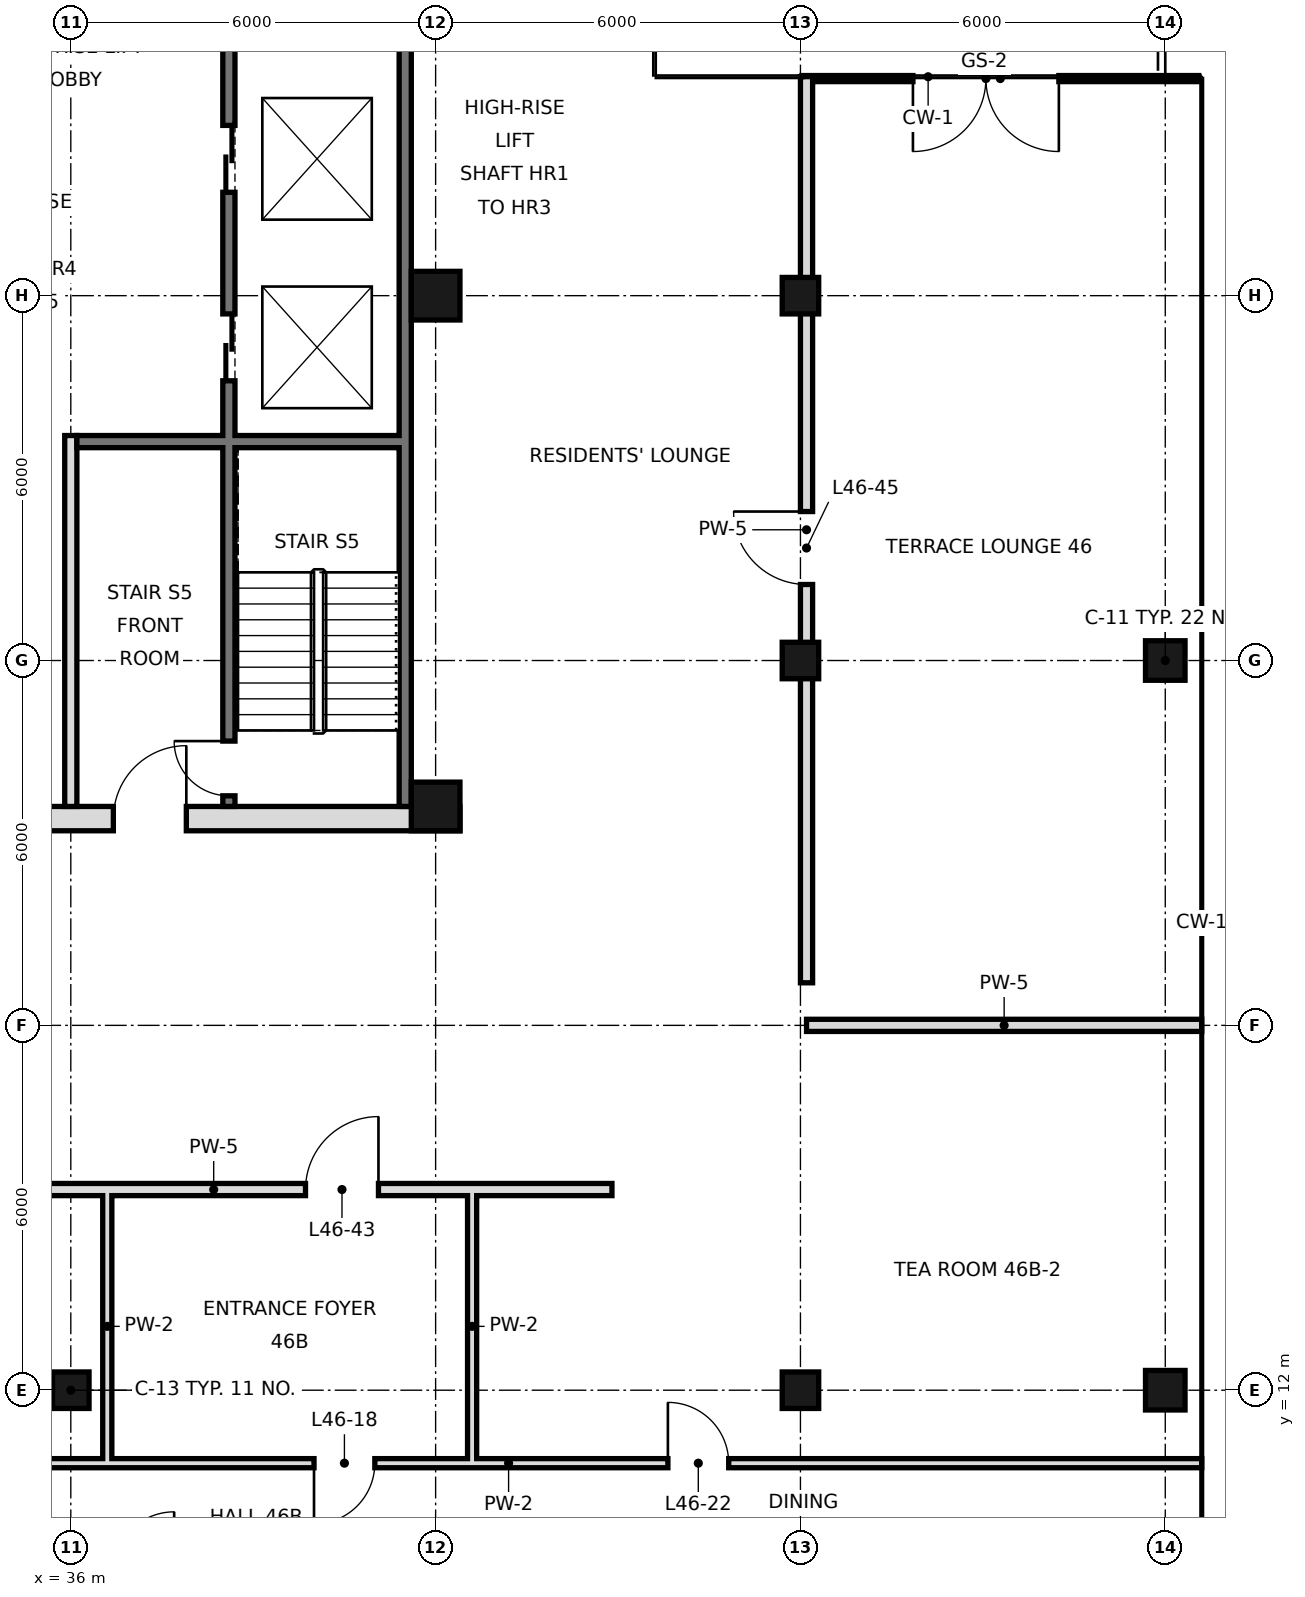
"""IFC4 building model, lengths in metres.
Left out: names, types, materials, properties, quantities, classifications, styles, units other than length and angle.
Written with IfcOpenShell. Run it as: python <this file> out.ifc"""

import sys

from ifc_helpers import new_model, si_unit, direction, frame, frame_2d, origin, origin_2d, place, context, subcontext, project, spatial, rectangle, hollow_rectangle, extrude, element, fill, save


model = new_model("IFC4")
c1 = context("Model", 3, precision=1e-05, world=origin(), true_north=direction((0.0, 1.0)))
c2 = subcontext(c1, "Body", "Model", "MODEL_VIEW")
j1 = project(units=[si_unit("LENGTHUNIT", "METRE"), si_unit("PLANEANGLEUNIT", "RADIAN")], contexts=[c1])
p1 = place(None, origin())
s1 = spatial("IfcSite", under=j1, at=p1, CompositionType="ELEMENT")
p2 = place(p1, origin())
s2 = spatial("IfcBuilding", under=s1, at=p2, CompositionType="ELEMENT")
p3 = place(p2, frame((0.0, 0.0, 199.2)))
s3 = spatial("IfcBuildingStorey", under=s2, at=p3, CompositionType="ELEMENT", Elevation=199.2)
p4 = place(p3, frame((36.0, 12.0, 0.0), z_axis=(0.0, 0.0, 1.0), x_axis=(1.0, 0.0, 0.0)))
e1 = element("IfcColumn", 1, at=p4, inside=s3, PredefinedType="COLUMN", context=c2, shape_type="SweptSolid", body=[
    extrude(hollow_rectangle(XDim=0.6, YDim=0.6, WallThickness=0.028, at=origin_2d()), origin(), (0.0, 0.0, 1.0), 3.6),
])
for number, where, z_axis, x_axis in (
    (2, (42.0, 21.6, 0.0), (0.0, 0.0, 1.0), (1.0, 0.0, 0.0)),
    (3, (42.0, 30.0, 0.0), (0.0, 0.0, 1.0), (1.0, 0.0, 0.0)),
):
    element("IfcColumn", number, at=place(p3, frame(where, z_axis=z_axis, x_axis=x_axis)), inside=s3, PredefinedType="COLUMN", context=c2, shape_type="SweptSolid", body=[
        extrude(hollow_rectangle(XDim=0.8, YDim=0.8, WallThickness=0.04, at=origin_2d()), origin(), (0.0, 0.0, 1.0), 3.6),
    ])
for number, where, z_axis, x_axis in (
    (4, (48.0, 12.0, 0.0), (0.0, 0.0, 1.0), (1.0, 0.0, 0.0)),
    (5, (48.0, 24.0, 0.0), (0.0, 0.0, 1.0), (1.0, 0.0, 0.0)),
    (6, (48.0, 30.0, 0.0), (0.0, 0.0, 1.0), (1.0, 0.0, 0.0)),
):
    element("IfcColumn", number, at=place(p3, frame(where, z_axis=z_axis, x_axis=x_axis)), inside=s3, PredefinedType="COLUMN", context=c2, shape_type="SweptSolid", body=[
        extrude(hollow_rectangle(XDim=0.6, YDim=0.6, WallThickness=0.028, at=origin_2d()), origin(), (0.0, 0.0, 1.0), 3.6),
    ])
for number, where, z_axis, x_axis in (
    (7, (54.0, 12.0, 0.0), (0.0, 0.0, 1.0), (1.0, 0.0, 0.0)),
    (8, (54.0, 24.0, 0.0), (0.0, 0.0, 1.0), (1.0, 0.0, 0.0)),
):
    element("IfcColumn", number, at=place(p3, frame(where, z_axis=z_axis, x_axis=x_axis)), inside=s3, PredefinedType="COLUMN", context=c2, shape_type="SweptSolid", body=[
        extrude(hollow_rectangle(XDim=0.65, YDim=0.65, WallThickness=0.032, at=origin_2d()), origin(), (0.0, 0.0, 1.0), 3.6),
    ])
p5 = place(p3, frame((54.55, 33.57, 0.0), z_axis=(0.0, 0.0, 1.0), x_axis=(-1.0, 0.0, 0.0)))
e9 = element("IfcWall", 9, at=p5, inside=s3, PredefinedType="SOLIDWALL", context=c2, shape_type="SweptSolid", body=[
    extrude(rectangle(XDim=6.525, YDim=0.1, at=frame_2d((3.263, 0.0))), origin(), (0.0, 0.0, 1.0), 3.42),
])
p6 = place(p5, frame((2.3, 0.0, 0.0)))
e10 = element("IfcOpeningElement", 10, at=p6, cuts=e9, PredefinedType="OPENING", context=c2, shape_type="SweptSolid", body=[
    extrude(rectangle(XDim=2.4, YDim=2.4, at=frame_2d((1.2, 1.2))), frame((0.0, 0.06, 0.0), z_axis=(0.0, -1.0, 0.0), x_axis=(1.0, 0.0, 0.0)), (0.0, 0.0, 1.0), 0.12),
])
for number, where, z_axis, x_axis in (
    (11, (36.6, 10.8, 0.0), (0.0, 0.0, 1.0), (0.0, 1.0, 0.0)),
    (12, (42.6, 10.8, 0.0), (0.0, 0.0, 1.0), (0.0, 1.0, 0.0)),
):
    element("IfcWall", number, at=place(p3, frame(where, z_axis=z_axis, x_axis=x_axis)), inside=s3, PredefinedType="PARTITIONING", context=c2, shape_type="SweptSolid", body=[
        extrude(rectangle(XDim=4.5, YDim=0.15, at=frame_2d((2.25, 0.0))), origin(), (0.0, 0.0, 1.0), 3.42),
    ])
p7 = place(p3, frame((48.1, 18.7, 0.0), z_axis=(0.0, 0.0, 1.0), x_axis=(0.0, 1.0, 0.0)))
e13 = element("IfcWall", 13, at=p7, inside=s3, PredefinedType="SOLIDWALL", context=c2, shape_type="SweptSolid", body=[
    extrude(rectangle(XDim=14.9, YDim=0.2, at=frame_2d((7.45, 0.0))), origin(), (0.0, 0.0, 1.0), 2.72),
])
p8 = place(p7, frame((6.55, 0.0, 0.0)))
e14 = element("IfcOpeningElement", 14, at=p8, cuts=e13, PredefinedType="OPENING", context=c2, shape_type="SweptSolid", body=[
    extrude(rectangle(XDim=1.2, YDim=2.4, at=frame_2d((0.6, 1.2))), frame((0.0, 0.11, 0.0), z_axis=(0.0, -1.0, 0.0), x_axis=(1.0, 0.0, 0.0)), (0.0, 0.0, 1.0), 0.22),
])
p9 = place(p3, frame((31.8, 10.8, 0.0), z_axis=(0.0, 0.0, 1.0), x_axis=(1.0, 0.0, 0.0)))
e15 = element("IfcWall", 15, at=p9, inside=s3, PredefinedType="PARTITIONING", context=c2, shape_type="SweptSolid", body=[
    extrude(rectangle(XDim=22.8, YDim=0.15, at=frame_2d((11.4, 0.0))), origin(), (0.0, 0.0, 1.0), 3.42),
])
p10 = place(p9, frame((8.2, 0.0, 0.0)))
e16 = element("IfcOpeningElement", 16, at=p10, cuts=e15, PredefinedType="OPENING", context=c2, shape_type="SweptSolid", body=[
    extrude(rectangle(XDim=1.0, YDim=2.4, at=frame_2d((0.5, 1.2))), frame((0.0, 0.085, 0.0), z_axis=(0.0, -1.0, 0.0), x_axis=(1.0, 0.0, 0.0)), (0.0, 0.0, 1.0), 0.17),
])
p11 = place(p9, frame((1.24, 0.0, 0.0)))
e17 = element("IfcOpeningElement", 17, at=p11, cuts=e15, PredefinedType="OPENING", context=c2, shape_type="SweptSolid", body=[
    extrude(rectangle(XDim=1.0, YDim=2.4, at=frame_2d((0.5, 1.2))), frame((0.0, 0.085, 0.0), z_axis=(0.0, -1.0, 0.0), x_axis=(1.0, 0.0, 0.0)), (0.0, 0.0, 1.0), 0.17),
])
p12 = place(p9, frame((14.02, 0.0, 0.0)))
e18 = element("IfcOpeningElement", 18, at=p12, cuts=e15, PredefinedType="OPENING", context=c2, shape_type="SweptSolid", body=[
    extrude(rectangle(XDim=1.0, YDim=2.4, at=frame_2d((0.5, 1.2))), frame((0.0, 0.085, 0.0), z_axis=(0.0, -1.0, 0.0), x_axis=(1.0, 0.0, 0.0)), (0.0, 0.0, 1.0), 0.17),
])
p13 = place(p3, frame((31.8, 15.3, 0.0), z_axis=(0.0, 0.0, 1.0), x_axis=(1.0, 0.0, 0.0)))
e19 = element("IfcWall", 19, at=p13, inside=s3, PredefinedType="SOLIDWALL", context=c2, shape_type="SweptSolid", body=[
    extrude(rectangle(XDim=13.1, YDim=0.2, at=frame_2d((6.55, 0.0))), origin(), (0.0, 0.0, 1.0), 2.72),
])
p14 = place(p13, frame((8.06, 0.0, 0.0)))
e20 = element("IfcOpeningElement", 20, at=p14, cuts=e19, PredefinedType="OPENING", context=c2, shape_type="SweptSolid", body=[
    extrude(rectangle(XDim=1.2, YDim=2.4, at=frame_2d((0.6, 1.2))), frame((0.0, 0.11, 0.0), z_axis=(0.0, -1.0, 0.0), x_axis=(1.0, 0.0, 0.0)), (0.0, 0.0, 1.0), 0.22),
])
p15 = place(p3, frame((48.1, 18.0, 0.0), z_axis=(0.0, 0.0, 1.0), x_axis=(1.0, 0.0, 0.0)))
e21 = element("IfcWall", 21, at=p15, inside=s3, PredefinedType="SOLIDWALL", context=c2, shape_type="SweptSolid", body=[
    extrude(rectangle(XDim=6.5, YDim=0.2, at=frame_2d((3.25, 0.0))), origin(), (0.0, 0.0, 1.0), 2.72),
])
p16 = place(p3, frame((41.5, 21.6, 0.0), z_axis=(0.0, 0.0, 1.0), x_axis=(0.0, 1.0, 0.0)))
e22 = element("IfcWall", 22, at=p16, inside=s3, PredefinedType="SOLIDWALL", context=c2, shape_type="SweptSolid", body=[
    extrude(rectangle(XDim=23.5, YDim=0.2, at=frame_2d((11.75, 0.0))), origin(), (0.0, 0.0, 1.0), 3.42),
])
p17 = place(p3, frame((5.6, 21.4, 0.0), z_axis=(0.0, 0.0, 1.0), x_axis=(1.0, 0.0, 0.0)))
e23 = element("IfcWall", 23, at=p17, inside=s3, PredefinedType="SOLIDWALL", context=c2, shape_type="SweptSolid", body=[
    extrude(rectangle(XDim=36.8, YDim=0.4, at=frame_2d((18.4, 0.0))), origin(), (0.0, 0.0, 1.0), 3.42),
])
p18 = place(p17, frame((8.5, 0.0, 0.0)))
e24 = element("IfcOpeningElement", 24, at=p18, cuts=e23, PredefinedType="OPENING", context=c2, shape_type="SweptSolid", body=[
    extrude(rectangle(XDim=1.8, YDim=2.1, at=frame_2d((0.9, 1.05))), frame((0.0, 0.21, 0.0), z_axis=(0.0, -1.0, 0.0), x_axis=(1.0, 0.0, 0.0)), (0.0, 0.0, 1.0), 0.42),
])
p19 = place(p17, frame((17.5, 0.0, 0.0)))
e25 = element("IfcOpeningElement", 25, at=p19, cuts=e23, PredefinedType="OPENING", context=c2, shape_type="SweptSolid", body=[
    extrude(rectangle(XDim=1.8, YDim=2.1, at=frame_2d((0.9, 1.05))), frame((0.0, 0.21, 0.0), z_axis=(0.0, -1.0, 0.0), x_axis=(1.0, 0.0, 0.0)), (0.0, 0.0, 1.0), 0.42),
])
p20 = place(p17, frame((26.5, 0.0, 0.0)))
e26 = element("IfcOpeningElement", 26, at=p20, cuts=e23, PredefinedType="OPENING", context=c2, shape_type="SweptSolid", body=[
    extrude(rectangle(XDim=1.8, YDim=2.1, at=frame_2d((0.9, 1.05))), frame((0.0, 0.21, 0.0), z_axis=(0.0, -1.0, 0.0), x_axis=(1.0, 0.0, 0.0)), (0.0, 0.0, 1.0), 0.42),
])
p21 = place(p17, frame((4.5, 0.0, 0.0)))
e27 = element("IfcOpeningElement", 27, at=p21, cuts=e23, PredefinedType="OPENING", context=c2, shape_type="SweptSolid", body=[
    extrude(rectangle(XDim=1.2, YDim=2.1, at=frame_2d((0.6, 1.05))), frame((0.0, 0.21, 0.0), z_axis=(0.0, -1.0, 0.0), x_axis=(1.0, 0.0, 0.0)), (0.0, 0.0, 1.0), 0.42),
])
p22 = place(p17, frame((31.1, 0.0, 0.0)))
e28 = element("IfcOpeningElement", 28, at=p22, cuts=e23, PredefinedType="OPENING", context=c2, shape_type="SweptSolid", body=[
    extrude(rectangle(XDim=1.2, YDim=2.1, at=frame_2d((0.6, 1.05))), frame((0.0, 0.21, 0.0), z_axis=(0.0, -1.0, 0.0), x_axis=(1.0, 0.0, 0.0)), (0.0, 0.0, 1.0), 0.42),
])
p23 = place(p3, frame((36.0, 21.6, 0.0), z_axis=(0.0, 0.0, 1.0), x_axis=(0.0, 1.0, 0.0)))
e29 = element("IfcWall", 29, at=p23, inside=s3, PredefinedType="PARTITIONING", context=c2, shape_type="SweptSolid", body=[
    extrude(rectangle(XDim=6.1, YDim=0.2, at=frame_2d((3.05, 0.0))), origin(), (0.0, 0.0, 1.0), 3.42),
])
p24 = place(p3, frame((38.6, 21.6, 0.0), z_axis=(0.0, 0.0, 1.0), x_axis=(0.0, 1.0, 0.0)))
e30 = element("IfcWall", 30, at=p24, inside=s3, PredefinedType="SOLIDWALL", context=c2, shape_type="SweptSolid", body=[
    extrude(rectangle(XDim=23.4, YDim=0.2, at=frame_2d((11.7, 0.0))), origin(), (0.0, 0.0, 1.0), 3.42),
])
p25 = place(p24, frame((7.0, 0.0, 0.0)))
e31 = element("IfcOpeningElement", 31, at=p25, cuts=e30, PredefinedType="OPENING", context=c2, shape_type="SweptSolid", body=[
    extrude(rectangle(XDim=1.1, YDim=2.1, at=frame_2d((0.55, 1.05))), frame((0.0, 0.11, 0.0), z_axis=(0.0, -1.0, 0.0), x_axis=(1.0, 0.0, 0.0)), (0.0, 0.0, 1.0), 0.22),
])
p26 = place(p24, frame((10.1, 0.0, 0.0)))
e32 = element("IfcOpeningElement", 32, at=p26, cuts=e30, PredefinedType="OPENING", context=c2, shape_type="SweptSolid", body=[
    extrude(rectangle(XDim=1.1, YDim=2.1, at=frame_2d((0.55, 1.05))), frame((0.0, 0.11, 0.0), z_axis=(0.0, -1.0, 0.0), x_axis=(1.0, 0.0, 0.0)), (0.0, 0.0, 1.0), 0.22),
])
p27 = place(p24, frame((13.2, 0.0, 0.0)))
e33 = element("IfcOpeningElement", 33, at=p27, cuts=e30, PredefinedType="OPENING", context=c2, shape_type="SweptSolid", body=[
    extrude(rectangle(XDim=1.1, YDim=2.1, at=frame_2d((0.55, 1.05))), frame((0.0, 0.11, 0.0), z_axis=(0.0, -1.0, 0.0), x_axis=(1.0, 0.0, 0.0)), (0.0, 0.0, 1.0), 0.22),
])
p28 = place(p24, frame((22.1, 0.0, 0.0)))
e34 = element("IfcOpeningElement", 34, at=p28, cuts=e30, PredefinedType="OPENING", context=c2, shape_type="SweptSolid", body=[
    extrude(rectangle(XDim=1.0, YDim=2.1, at=frame_2d((0.5, 1.05))), frame((0.0, 0.11, 0.0), z_axis=(0.0, -1.0, 0.0), x_axis=(1.0, 0.0, 0.0)), (0.0, 0.0, 1.0), 0.22),
])
p29 = place(p24, frame((0.175, 0.0, 0.0)))
e35 = element("IfcOpeningElement", 35, at=p29, cuts=e30, PredefinedType="OPENING", context=c2, shape_type="SweptSolid", body=[
    extrude(rectangle(XDim=0.9, YDim=2.1, at=frame_2d((0.45, 1.05))), frame((0.0, 0.11, 0.0), z_axis=(0.0, -1.0, 0.0), x_axis=(1.0, 0.0, 0.0)), (0.0, 0.0, 1.0), 0.22),
])
p30 = place(p3, frame((36.1, 27.6, 0.0), z_axis=(0.0, 0.0, 1.0), x_axis=(1.0, 0.0, 0.0)))
e36 = element("IfcWall", 36, at=p30, inside=s3, PredefinedType="SOLIDWALL", context=c2, shape_type="SweptSolid", body=[
    extrude(rectangle(XDim=5.3, YDim=0.2, at=frame_2d((2.65, 0.0))), origin(), (0.0, 0.0, 1.0), 3.42),
])
p31 = place(p6, origin())
e37 = element("IfcDoor", 37, at=p31, inside=s3, OperationType="DOUBLE_DOOR_SINGLE_SWING", PredefinedType="DOOR", context=c2, shape_type="SweptSolid", body=[
    extrude(rectangle(XDim=2.4, YDim=2.4, at=frame_2d((1.2, 1.2))), frame((0.0, 0.025, 0.0), z_axis=(0.0, -1.0, 0.0), x_axis=(1.0, 0.0, 0.0)), (0.0, 0.0, 1.0), 0.05),
])
fill(e10, e37)
p32 = place(p10, frame((1.0, 0.0, 0.0), z_axis=(0.0, 0.0, 1.0), x_axis=(-1.0, 0.0, 0.0)))
e38 = element("IfcDoor", 38, at=p32, inside=s3, OperationType="SINGLE_SWING_RIGHT", PredefinedType="DOOR", context=c2, shape_type="SweptSolid", body=[
    extrude(rectangle(XDim=1.0, YDim=2.4, at=frame_2d((0.5, 1.2))), frame((0.0, 0.025, 0.0), z_axis=(0.0, -1.0, 0.0), x_axis=(1.0, 0.0, 0.0)), (0.0, 0.0, 1.0), 0.05),
])
fill(e16, e38)
p33 = place(p12, origin())
e39 = element("IfcDoor", 39, at=p33, inside=s3, OperationType="SINGLE_SWING_LEFT", PredefinedType="DOOR", context=c2, shape_type="SweptSolid", body=[
    extrude(rectangle(XDim=1.0, YDim=2.4, at=frame_2d((0.5, 1.2))), frame((0.0, 0.025, 0.0), z_axis=(0.0, -1.0, 0.0), x_axis=(1.0, 0.0, 0.0)), (0.0, 0.0, 1.0), 0.05),
])
fill(e18, e39)
p34 = place(p14, frame((1.2, 0.0, 0.0), z_axis=(0.0, 0.0, 1.0), x_axis=(-1.0, 0.0, 0.0)))
e40 = element("IfcDoor", 40, at=p34, inside=s3, OperationType="SINGLE_SWING_LEFT", PredefinedType="DOOR", context=c2, shape_type="SweptSolid", body=[
    extrude(rectangle(XDim=1.2, YDim=2.4, at=frame_2d((0.6, 1.2))), frame((0.0, 0.025, 0.0), z_axis=(0.0, -1.0, 0.0), x_axis=(1.0, 0.0, 0.0)), (0.0, 0.0, 1.0), 0.05),
])
fill(e20, e40)
p35 = place(p8, frame((1.2, 0.0, 0.0), z_axis=(0.0, 0.0, 1.0), x_axis=(-1.0, 0.0, 0.0)))
e41 = element("IfcDoor", 41, at=p35, inside=s3, OperationType="SINGLE_SWING_LEFT", PredefinedType="DOOR", context=c2, shape_type="SweptSolid", body=[
    extrude(rectangle(XDim=1.2, YDim=2.4, at=frame_2d((0.6, 1.2))), frame((0.0, 0.025, 0.0), z_axis=(0.0, -1.0, 0.0), x_axis=(1.0, 0.0, 0.0)), (0.0, 0.0, 1.0), 0.05),
])
fill(e14, e41)
p36 = place(p22, frame((1.2, 0.0, 0.0), z_axis=(0.0, 0.0, 1.0), x_axis=(-1.0, 0.0, 0.0)))
e42 = element("IfcDoor", 42, at=p36, inside=s3, OperationType="SINGLE_SWING_LEFT", PredefinedType="DOOR", context=c2, shape_type="SweptSolid", body=[
    extrude(rectangle(XDim=1.2, YDim=2.1, at=frame_2d((0.6, 1.05))), frame((0.0, 0.025, 0.0), z_axis=(0.0, -1.0, 0.0), x_axis=(1.0, 0.0, 0.0)), (0.0, 0.0, 1.0), 0.05),
])
fill(e28, e42)
p37 = place(p25, origin())
e43 = element("IfcDoor", 43, at=p37, inside=s3, OperationType="DOUBLE_DOOR_SLIDING", PredefinedType="DOOR", context=c2, shape_type="SweptSolid", body=[
    extrude(rectangle(XDim=1.1, YDim=2.1, at=frame_2d((0.55, 1.05))), frame((0.0, 0.025, 0.0), z_axis=(0.0, -1.0, 0.0), x_axis=(1.0, 0.0, 0.0)), (0.0, 0.0, 1.0), 0.05),
])
fill(e31, e43)
p38 = place(p26, origin())
e44 = element("IfcDoor", 44, at=p38, inside=s3, OperationType="DOUBLE_DOOR_SLIDING", PredefinedType="DOOR", context=c2, shape_type="SweptSolid", body=[
    extrude(rectangle(XDim=1.1, YDim=2.1, at=frame_2d((0.55, 1.05))), frame((0.0, 0.025, 0.0), z_axis=(0.0, -1.0, 0.0), x_axis=(1.0, 0.0, 0.0)), (0.0, 0.0, 1.0), 0.05),
])
fill(e32, e44)
p39 = place(p29, frame((0.9, 0.0, 0.0), z_axis=(0.0, 0.0, 1.0), x_axis=(-1.0, 0.0, 0.0)))
e45 = element("IfcDoor", 45, at=p39, inside=s3, OperationType="SINGLE_SWING_LEFT", PredefinedType="DOOR", context=c2, shape_type="SweptSolid", body=[
    extrude(rectangle(XDim=0.9, YDim=2.1, at=frame_2d((0.45, 1.05))), frame((0.0, 0.025, 0.0), z_axis=(0.0, -1.0, 0.0), x_axis=(1.0, 0.0, 0.0)), (0.0, 0.0, 1.0), 0.05),
])
fill(e35, e45)
save(model, sys.argv[1])
